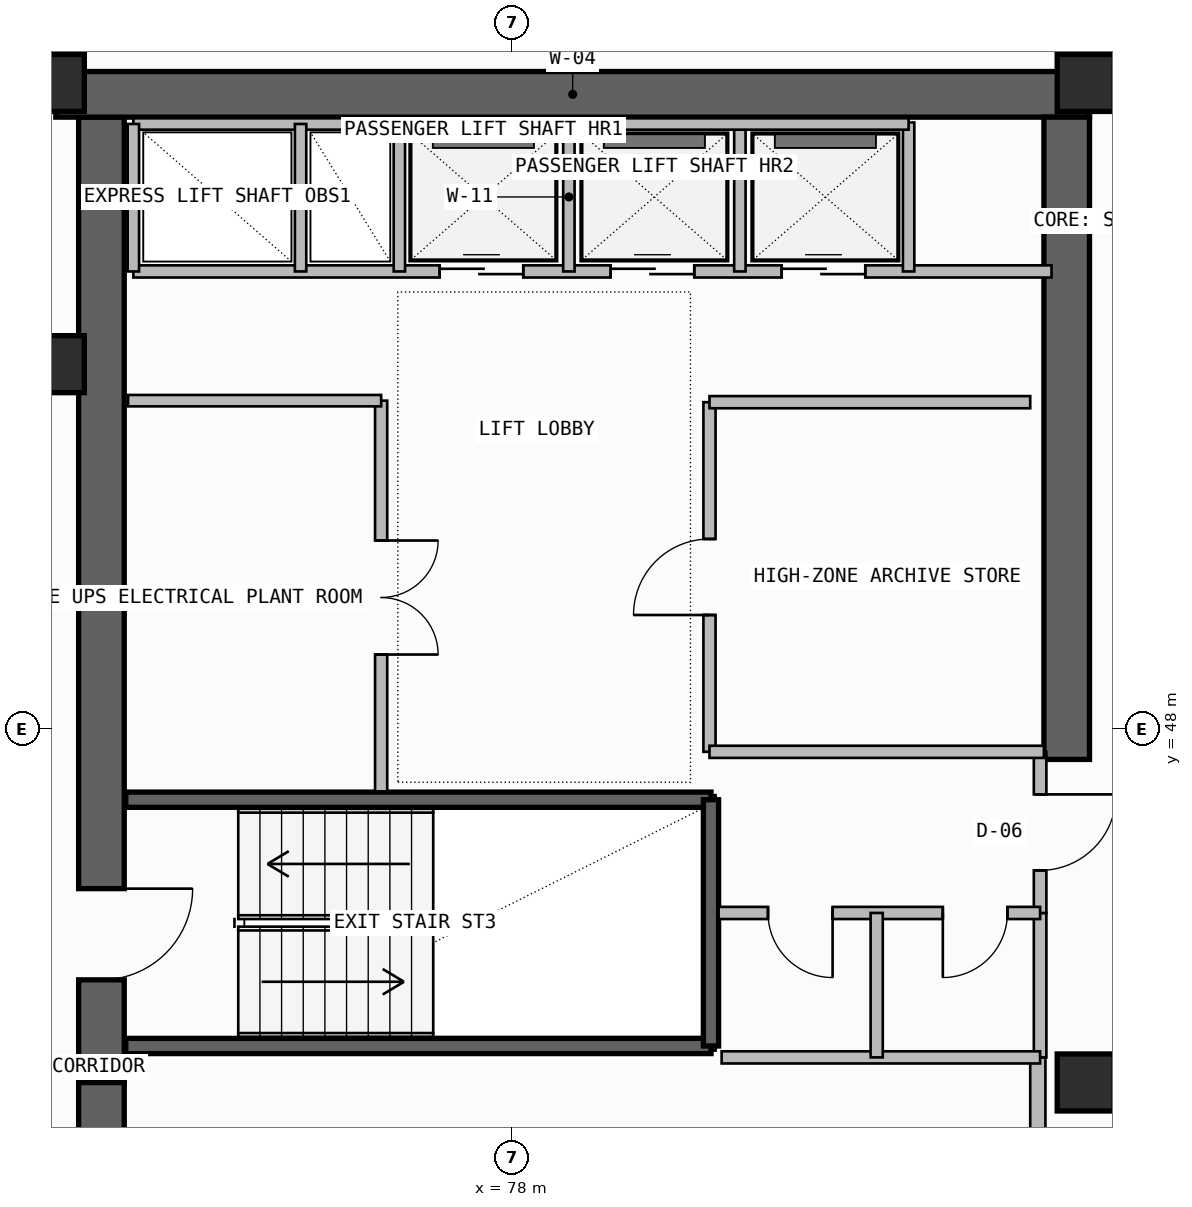
"""IFC4 building model, lengths in metres.
Left out: names, types, materials, properties, quantities, classifications, styles, units other than length and angle.
Written with IfcOpenShell. Run it as: python <this file> out.ifc"""

import sys

from ifc_helpers import new_model, si_unit, direction, frame, frame_2d, origin, origin_2d, place, context, subcontext, project, spatial, rectangle, extrude, element, fill, save


model = new_model("IFC4")
c1 = context("Model", 3, precision=1e-05, world=origin(), true_north=direction((0.0, 1.0)))
c2 = subcontext(c1, "Body", "Model", "MODEL_VIEW")
j1 = project(units=[si_unit("LENGTHUNIT", "METRE"), si_unit("PLANEANGLEUNIT", "RADIAN")], contexts=[c1])
p1 = place(None, origin())
s1 = spatial("IfcSite", under=j1, at=p1, CompositionType="ELEMENT")
p2 = place(p1, origin())
s2 = spatial("IfcBuilding", under=s1, at=p2, CompositionType="ELEMENT")
p3 = place(p2, frame((0.0, 0.0, 281.86)))
s3 = spatial("IfcBuildingStorey", under=s2, at=p3, CompositionType="ELEMENT", Elevation=281.86)
p4 = place(p3, frame((72.6, 35.5, -0.26), z_axis=(0.0, 0.0, 1.0), x_axis=(0.0, 1.0, 0.0)))
e1 = element("IfcWall", 1, at=p4, inside=s3, PredefinedType="SHEAR", context=c2, shape_type="SweptSolid", body=[
    extrude(rectangle(XDim=7.85, YDim=0.6, at=frame_2d((3.925, 0.0))), origin(), (0.0, 0.0, 1.0), 3.52),
])
p5 = place(p4, frame((1.45, 0.0, 0.26)))
e2 = element("IfcOpeningElement", 2, at=p5, cuts=e1, PredefinedType="OPENING", context=c2, shape_type="SweptSolid", body=[
    extrude(rectangle(XDim=1.2, YDim=2.2, at=frame_2d((0.6, 1.1))), frame((0.0, 0.31, 0.0), z_axis=(0.0, -1.0, 0.0), x_axis=(1.0, 0.0, 0.0)), (0.0, 0.0, 1.0), 0.62),
])
p6 = place(p3, frame((72.6, 43.35, -0.26), z_axis=(0.0, 0.0, 1.0), x_axis=(0.0, 1.0, 0.0)))
e3 = element("IfcWall", 3, at=p6, inside=s3, PredefinedType="SHEAR", context=c2, shape_type="SweptSolid", body=[
    extrude(rectangle(XDim=12.7, YDim=0.6, at=frame_2d((6.35, 0.0))), origin(), (0.0, 0.0, 1.0), 3.52),
])
p7 = place(p6, frame((1.35, 0.0, 0.26)))
e4 = element("IfcOpeningElement", 4, at=p7, cuts=e3, PredefinedType="OPENING", context=c2, shape_type="SweptSolid", body=[
    extrude(rectangle(XDim=1.2, YDim=2.2, at=frame_2d((0.6, 1.1))), frame((0.0, 0.31, 0.0), z_axis=(0.0, -1.0, 0.0), x_axis=(1.0, 0.0, 0.0)), (0.0, 0.0, 1.0), 0.62),
])
p8 = place(p3, frame((72.0, 56.35, -0.26), z_axis=(0.0, 0.0, 1.0), x_axis=(1.0, 0.0, 0.0)))
e5 = element("IfcWall", 5, at=p8, inside=s3, PredefinedType="SHEAR", context=c2, shape_type="SweptSolid", body=[
    extrude(rectangle(XDim=13.6, YDim=0.6, at=frame_2d((6.8, 0.0))), origin(), (0.0, 0.0, 1.0), 3.52),
])
p9 = place(p3, frame((85.3, 47.6, -0.26), z_axis=(0.0, 0.0, 1.0), x_axis=(0.0, 1.0, 0.0)))
e6 = element("IfcWall", 6, at=p9, inside=s3, PredefinedType="SHEAR", context=c2, shape_type="SweptSolid", body=[
    extrude(rectangle(XDim=8.45, YDim=0.6, at=frame_2d((4.225, 0.0))), origin(), (0.0, 0.0, 1.0), 3.52),
])
for number, where, z_axis, x_axis in (
    (7, (85.55, 43.35, 0.0), (0.0, 0.0, 1.0), (1.0, 0.0, 0.0)),
    (8, (72.0, 52.8, 0.0), (0.0, 0.0, 1.0), (1.0, 0.0, 0.0)),
    (9, (72.0, 56.5, 0.0), (0.0, 0.0, 1.0), (1.0, 0.0, 0.0)),
    (10, (85.55, 56.5, 0.0), (0.0, 0.0, 1.0), (1.0, 0.0, 0.0)),
):
    element("IfcColumn", number, at=place(p3, frame(where, z_axis=z_axis, x_axis=x_axis)), inside=s3, PredefinedType="COLUMN", context=c2, shape_type="SweptSolid", body=[
        extrude(rectangle(XDim=0.75, YDim=0.75, at=origin_2d()), origin(), (0.0, 0.0, 1.0), 3.52),
    ])
p10 = place(p3, frame((84.92, 38.85, 0.0), z_axis=(0.0, 0.0, 1.0), x_axis=(0.0, 1.0, 0.0)))
e11 = element("IfcWall", 11, at=p10, inside=s3, PredefinedType="SOLIDWALL", context=c2, shape_type="SweptSolid", body=[
    extrude(rectangle(XDim=4.83, YDim=0.2, at=frame_2d((2.415, 0.0))), origin(), (0.0, 0.0, 1.0), 3.26),
])
p11 = place(p10, frame((1.25, 0.0, 0.0)))
e12 = element("IfcOpeningElement", 12, at=p11, cuts=e11, PredefinedType="OPENING", context=c2, shape_type="SweptSolid", body=[
    extrude(rectangle(XDim=1.1, YDim=2.2, at=frame_2d((0.55, 1.1))), frame((0.0, 0.11, 0.0), z_axis=(0.0, -1.0, 0.0), x_axis=(1.0, 0.0, 0.0)), (0.0, 0.0, 1.0), 0.22),
])
for number, where, z_axis, x_axis in (
    (13, (72.92, 43.83, -0.26), (0.0, 0.0, 1.0), (1.0, 0.0, 0.0)),
    (14, (72.92, 47.07, -0.26), (0.0, 0.0, 1.0), (1.0, 0.0, 0.0)),
):
    element("IfcWall", number, at=place(p3, frame(where, z_axis=z_axis, x_axis=x_axis)), inside=s3, PredefinedType="SOLIDWALL", context=c2, shape_type="SweptSolid", body=[
        extrude(rectangle(XDim=7.7, YDim=0.2, at=frame_2d((3.85, 0.0))), origin(), (0.0, 0.0, 1.0), 3.52),
    ])
p12 = place(p3, frame((80.62, 43.83, -0.26), z_axis=(0.0, 0.0, 1.0), x_axis=(0.0, 1.0, 0.0)))
e15 = element("IfcWall", 15, at=p12, inside=s3, PredefinedType="SOLIDWALL", context=c2, shape_type="SweptSolid", body=[
    extrude(rectangle(XDim=3.24, YDim=0.2, at=frame_2d((1.62, 0.0))), origin(), (0.0, 0.0, 1.0), 3.52),
])
p13 = place(p3, frame((84.95, 43.68, 0.0), z_axis=(0.0, 0.0, 1.0), x_axis=(0.0, 1.0, 0.0)))
e16 = element("IfcWall", 16, at=p13, inside=s3, PredefinedType="PLUMBINGWALL", context=c2, shape_type="SweptSolid", body=[
    extrude(rectangle(XDim=1.9, YDim=0.165, at=frame_2d((0.95, 0.0))), origin(), (0.0, 0.0, 1.0), 3.26),
])
p14 = place(p3, frame((84.95, 45.58, 0.0), z_axis=(0.0, 0.0, 1.0), x_axis=(0.0, 1.0, 0.0)))
e17 = element("IfcWall", 17, at=p14, inside=s3, PredefinedType="PARTITIONING", context=c2, shape_type="SweptSolid", body=[
    extrude(rectangle(XDim=2.12, YDim=0.165, at=frame_2d((1.06, 0.0))), origin(), (0.0, 0.0, 1.0), 3.26),
])
p15 = place(p14, frame((0.56, 0.0, 0.0)))
e18 = element("IfcOpeningElement", 18, at=p15, cuts=e17, PredefinedType="OPENING", context=c2, shape_type="SweptSolid", body=[
    extrude(rectangle(XDim=1.0, YDim=2.2, at=frame_2d((0.5, 1.1))), frame((0.0, 0.093, 0.0), z_axis=(0.0, -1.0, 0.0), x_axis=(1.0, 0.0, 0.0)), (0.0, 0.0, 1.0), 0.185),
])
p16 = place(p3, frame((80.72, 45.58, 0.0), z_axis=(0.0, 0.0, 1.0), x_axis=(1.0, 0.0, 0.0)))
e19 = element("IfcWall", 19, at=p16, inside=s3, PredefinedType="PLUMBINGWALL", context=c2, shape_type="SweptSolid", body=[
    extrude(rectangle(XDim=4.23, YDim=0.16, at=frame_2d((2.115, 0.0))), origin(), (0.0, 0.0, 1.0), 3.26),
])
p17 = place(p16, frame((0.65, 0.0, 0.0)))
e20 = element("IfcOpeningElement", 20, at=p17, cuts=e19, PredefinedType="OPENING", context=c2, shape_type="SweptSolid", body=[
    extrude(rectangle(XDim=0.85, YDim=2.05, at=frame_2d((0.425, 1.025))), frame((0.0, 0.09, 0.0), z_axis=(0.0, -1.0, 0.0), x_axis=(1.0, 0.0, 0.0)), (0.0, 0.0, 1.0), 0.18),
])
p18 = place(p16, frame((2.95, 0.0, 0.0)))
e21 = element("IfcOpeningElement", 21, at=p18, cuts=e19, PredefinedType="OPENING", context=c2, shape_type="SweptSolid", body=[
    extrude(rectangle(XDim=0.85, YDim=2.05, at=frame_2d((0.425, 1.025))), frame((0.0, 0.09, 0.0), z_axis=(0.0, -1.0, 0.0), x_axis=(1.0, 0.0, 0.0)), (0.0, 0.0, 1.0), 0.18),
])
p19 = place(p3, frame((80.76, 43.68, 0.0), z_axis=(0.0, 0.0, 1.0), x_axis=(1.0, 0.0, 0.0)))
e22 = element("IfcWall", 22, at=p19, inside=s3, PredefinedType="PLUMBINGWALL", context=c2, shape_type="SweptSolid", body=[
    extrude(rectangle(XDim=4.19, YDim=0.16, at=frame_2d((2.095, 0.0))), origin(), (0.0, 0.0, 1.0), 3.26),
])
p20 = place(p3, frame((82.8, 43.68, 0.0), z_axis=(0.0, 0.0, 1.0), x_axis=(0.0, 1.0, 0.0)))
e23 = element("IfcWall", 23, at=p20, inside=s3, PredefinedType="PLUMBINGWALL", context=c2, shape_type="SweptSolid", body=[
    extrude(rectangle(XDim=1.9, YDim=0.16, at=frame_2d((0.95, 0.0))), origin(), (0.0, 0.0, 1.0), 3.26),
])
p21 = place(p3, frame((76.28, 47.18, 0.0), z_axis=(0.0, 0.0, 1.0), x_axis=(0.0, 1.0, 0.0)))
e24 = element("IfcWall", 24, at=p21, inside=s3, PredefinedType="SOLIDWALL", context=c2, shape_type="SweptSolid", body=[
    extrude(rectangle(XDim=5.14, YDim=0.16, at=frame_2d((2.57, 0.0))), origin(), (0.0, 0.0, 1.0), 3.26),
])
p22 = place(p21, frame((1.8, 0.0, 0.0)))
e25 = element("IfcOpeningElement", 25, at=p22, cuts=e24, PredefinedType="OPENING", context=c2, shape_type="SweptSolid", body=[
    extrude(rectangle(XDim=1.5, YDim=2.25, at=frame_2d((0.75, 1.125))), frame((0.0, 0.09, 0.0), z_axis=(0.0, -1.0, 0.0), x_axis=(1.0, 0.0, 0.0)), (0.0, 0.0, 1.0), 0.18),
])
p23 = place(p3, frame((72.95, 52.32, 0.0), z_axis=(0.0, 0.0, 1.0), x_axis=(1.0, 0.0, 0.0)))
e26 = element("IfcWall", 26, at=p23, inside=s3, PredefinedType="SOLIDWALL", context=c2, shape_type="SweptSolid", body=[
    extrude(rectangle(XDim=3.33, YDim=0.15, at=frame_2d((1.665, 0.0))), origin(), (0.0, 0.0, 1.0), 3.26),
])
p24 = place(p3, frame((80.6, 47.7, 0.0), z_axis=(0.0, 0.0, 1.0), x_axis=(0.0, 1.0, 0.0)))
e27 = element("IfcWall", 27, at=p24, inside=s3, PredefinedType="SOLIDWALL", context=c2, shape_type="SweptSolid", body=[
    extrude(rectangle(XDim=4.6, YDim=0.16, at=frame_2d((2.3, 0.0))), origin(), (0.0, 0.0, 1.0), 3.26),
])
p25 = place(p24, frame((1.8, 0.0, 0.0)))
e28 = element("IfcOpeningElement", 28, at=p25, cuts=e27, PredefinedType="OPENING", context=c2, shape_type="SweptSolid", body=[
    extrude(rectangle(XDim=1.0, YDim=2.2, at=frame_2d((0.5, 1.1))), frame((0.0, 0.09, 0.0), z_axis=(0.0, -1.0, 0.0), x_axis=(1.0, 0.0, 0.0)), (0.0, 0.0, 1.0), 0.18),
])
p26 = place(p3, frame((80.6, 47.7, 0.0), z_axis=(0.0, 0.0, 1.0), x_axis=(1.0, 0.0, 0.0)))
e29 = element("IfcWall", 29, at=p26, inside=s3, PredefinedType="SOLIDWALL", context=c2, shape_type="SweptSolid", body=[
    extrude(rectangle(XDim=4.4, YDim=0.16, at=frame_2d((2.2, 0.0))), origin(), (0.0, 0.0, 1.0), 3.26),
])
p27 = place(p3, frame((80.6, 52.3, 0.0), z_axis=(0.0, 0.0, 1.0), x_axis=(1.0, 0.0, 0.0)))
e30 = element("IfcWall", 30, at=p27, inside=s3, PredefinedType="SOLIDWALL", context=c2, shape_type="SweptSolid", body=[
    extrude(rectangle(XDim=4.22, YDim=0.16, at=frame_2d((2.11, 0.0))), origin(), (0.0, 0.0, 1.0), 3.26),
])
p28 = place(p3, frame((73.02, 54.02, 0.0), z_axis=(0.0, 0.0, 1.0), x_axis=(1.0, 0.0, 0.0)))
e31 = element("IfcWall", 31, at=p28, inside=s3, PredefinedType="SOLIDWALL", context=c2, shape_type="SweptSolid", body=[
    extrude(rectangle(XDim=12.08, YDim=0.16, at=frame_2d((6.04, 0.0))), origin(), (0.0, 0.0, 1.0), 3.26),
])
p29 = place(p28, frame((4.03, 0.0, 0.0)))
e32 = element("IfcOpeningElement", 32, at=p29, cuts=e31, PredefinedType="OPENING", context=c2, shape_type="SweptSolid", body=[
    extrude(rectangle(XDim=1.1, YDim=2.25, at=frame_2d((0.55, 1.125))), frame((0.0, 0.09, 0.0), z_axis=(0.0, -1.0, 0.0), x_axis=(1.0, 0.0, 0.0)), (0.0, 0.0, 1.0), 0.18),
])
p30 = place(p28, frame((6.28, 0.0, 0.0)))
e33 = element("IfcOpeningElement", 33, at=p30, cuts=e31, PredefinedType="OPENING", context=c2, shape_type="SweptSolid", body=[
    extrude(rectangle(XDim=1.1, YDim=2.25, at=frame_2d((0.55, 1.125))), frame((0.0, 0.09, 0.0), z_axis=(0.0, -1.0, 0.0), x_axis=(1.0, 0.0, 0.0)), (0.0, 0.0, 1.0), 0.18),
])
p31 = place(p28, frame((8.53, 0.0, 0.0)))
e34 = element("IfcOpeningElement", 34, at=p31, cuts=e31, PredefinedType="OPENING", context=c2, shape_type="SweptSolid", body=[
    extrude(rectangle(XDim=1.1, YDim=2.25, at=frame_2d((0.55, 1.125))), frame((0.0, 0.09, 0.0), z_axis=(0.0, -1.0, 0.0), x_axis=(1.0, 0.0, 0.0)), (0.0, 0.0, 1.0), 0.18),
])
p32 = place(p3, frame((73.02, 55.96, 0.0), z_axis=(0.0, 0.0, 1.0), x_axis=(1.0, 0.0, 0.0)))
e35 = element("IfcWall", 35, at=p32, inside=s3, PredefinedType="SOLIDWALL", context=c2, shape_type="SweptSolid", body=[
    extrude(rectangle(XDim=3.5, YDim=0.15, at=frame_2d((1.75, 0.0))), origin(), (0.0, 0.0, 1.0), 3.26),
])
p33 = place(p3, frame((73.02, 54.02, 0.0), z_axis=(0.0, 0.0, 1.0), x_axis=(0.0, 1.0, 0.0)))
e36 = element("IfcWall", 36, at=p33, inside=s3, PredefinedType="PLUMBINGWALL", context=c2, shape_type="SweptSolid", body=[
    extrude(rectangle(XDim=1.94, YDim=0.15, at=frame_2d((0.97, 0.0))), origin(), (0.0, 0.0, 1.0), 3.26),
])
p34 = place(p3, frame((76.52, 54.02, 0.0), z_axis=(0.0, 0.0, 1.0), x_axis=(0.0, 1.0, 0.0)))
e37 = element("IfcWall", 37, at=p34, inside=s3, PredefinedType="SOLIDWALL", context=c2, shape_type="SweptSolid", body=[
    extrude(rectangle(XDim=1.94, YDim=0.15, at=frame_2d((0.97, 0.0))), origin(), (0.0, 0.0, 1.0), 3.26),
])
p35 = place(p3, frame((75.22, 54.02, 0.0), z_axis=(0.0, 0.0, 1.0), x_axis=(0.0, 1.0, 0.0)))
e38 = element("IfcWall", 38, at=p35, inside=s3, PredefinedType="PLUMBINGWALL", context=c2, shape_type="SweptSolid", body=[
    extrude(rectangle(XDim=1.94, YDim=0.15, at=frame_2d((0.97, 0.0))), origin(), (0.0, 0.0, 1.0), 3.26),
])
for number, where, z_axis, x_axis in (
    (39, (78.75, 54.02, 0.0), (0.0, 0.0, 1.0), (0.0, 1.0, 0.0)),
    (40, (81.0, 54.02, 0.0), (0.0, 0.0, 1.0), (0.0, 1.0, 0.0)),
):
    element("IfcWall", number, at=place(p3, frame(where, z_axis=z_axis, x_axis=x_axis)), inside=s3, PredefinedType="PLUMBINGWALL", context=c2, shape_type="SweptSolid", body=[
        extrude(rectangle(XDim=1.96, YDim=0.15, at=frame_2d((0.98, 0.0))), origin(), (0.0, 0.0, 1.0), 3.26),
    ])
p36 = place(p3, frame((83.22, 54.02, 0.0), z_axis=(0.0, 0.0, 1.0), x_axis=(0.0, 1.0, 0.0)))
e41 = element("IfcWall", 41, at=p36, inside=s3, PredefinedType="SOLIDWALL", context=c2, shape_type="SweptSolid", body=[
    extrude(rectangle(XDim=1.96, YDim=0.15, at=frame_2d((0.98, 0.0))), origin(), (0.0, 0.0, 1.0), 3.26),
])
p37 = place(p3, frame((76.52, 55.96, 0.0), z_axis=(0.0, 0.0, 1.0), x_axis=(1.0, 0.0, 0.0)))
e42 = element("IfcWall", 42, at=p37, inside=s3, PredefinedType="SOLIDWALL", context=c2, shape_type="SweptSolid", body=[
    extrude(rectangle(XDim=6.7, YDim=0.15, at=frame_2d((3.35, 0.0))), origin(), (0.0, 0.0, 1.0), 3.26),
])
p38 = place(p7, frame((1.2, 0.0, 0.0), z_axis=(0.0, 0.0, 1.0), x_axis=(-1.0, 0.0, 0.0)))
e43 = element("IfcDoor", 43, at=p38, inside=s3, OperationType="SINGLE_SWING_LEFT", PredefinedType="USERDEFINED", context=c2, shape_type="SweptSolid", body=[
    extrude(rectangle(XDim=1.2, YDim=2.2, at=frame_2d((0.6, 1.1))), frame((0.0, 0.025, 0.0), z_axis=(0.0, -1.0, 0.0), x_axis=(1.0, 0.0, 0.0)), (0.0, 0.0, 1.0), 0.05),
])
fill(e4, e43)
p39 = place(p15, frame((1.0, 0.0, 0.0), z_axis=(0.0, 0.0, 1.0), x_axis=(-1.0, 0.0, 0.0)))
e44 = element("IfcDoor", 44, at=p39, inside=s3, OperationType="SINGLE_SWING_LEFT", PredefinedType="DOOR", context=c2, shape_type="SweptSolid", body=[
    extrude(rectangle(XDim=1.0, YDim=2.2, at=frame_2d((0.5, 1.1))), frame((0.0, 0.025, 0.0), z_axis=(0.0, -1.0, 0.0), x_axis=(1.0, 0.0, 0.0)), (0.0, 0.0, 1.0), 0.05),
])
fill(e18, e44)
p40 = place(p17, frame((0.85, 0.0, 0.0), z_axis=(0.0, 0.0, 1.0), x_axis=(-1.0, 0.0, 0.0)))
e45 = element("IfcDoor", 45, at=p40, inside=s3, OperationType="SINGLE_SWING_LEFT", PredefinedType="DOOR", context=c2, shape_type="SweptSolid", body=[
    extrude(rectangle(XDim=0.85, YDim=2.05, at=frame_2d((0.425, 1.025))), frame((0.0, 0.025, 0.0), z_axis=(0.0, -1.0, 0.0), x_axis=(1.0, 0.0, 0.0)), (0.0, 0.0, 1.0), 0.05),
])
fill(e20, e45)
p41 = place(p18, frame((0.85, 0.0, 0.0), z_axis=(0.0, 0.0, 1.0), x_axis=(-1.0, 0.0, 0.0)))
e46 = element("IfcDoor", 46, at=p41, inside=s3, OperationType="SINGLE_SWING_RIGHT", PredefinedType="DOOR", context=c2, shape_type="SweptSolid", body=[
    extrude(rectangle(XDim=0.85, YDim=2.05, at=frame_2d((0.425, 1.025))), frame((0.0, 0.025, 0.0), z_axis=(0.0, -1.0, 0.0), x_axis=(1.0, 0.0, 0.0)), (0.0, 0.0, 1.0), 0.05),
])
fill(e21, e46)
p42 = place(p22, frame((1.5, 0.0, 0.0), z_axis=(0.0, 0.0, 1.0), x_axis=(-1.0, 0.0, 0.0)))
e47 = element("IfcDoor", 47, at=p42, inside=s3, OperationType="DOUBLE_DOOR_SINGLE_SWING", PredefinedType="DOOR", context=c2, shape_type="SweptSolid", body=[
    extrude(rectangle(XDim=1.5, YDim=2.25, at=frame_2d((0.75, 1.125))), frame((0.0, 0.025, 0.0), z_axis=(0.0, -1.0, 0.0), x_axis=(1.0, 0.0, 0.0)), (0.0, 0.0, 1.0), 0.05),
])
fill(e25, e47)
p43 = place(p25, origin())
e48 = element("IfcDoor", 48, at=p43, inside=s3, OperationType="SINGLE_SWING_LEFT", PredefinedType="DOOR", context=c2, shape_type="SweptSolid", body=[
    extrude(rectangle(XDim=1.0, YDim=2.2, at=frame_2d((0.5, 1.1))), frame((0.0, 0.025, 0.0), z_axis=(0.0, -1.0, 0.0), x_axis=(1.0, 0.0, 0.0)), (0.0, 0.0, 1.0), 0.05),
])
fill(e28, e48)
p44 = place(p29, origin())
e49 = element("IfcDoor", 49, at=p44, inside=s3, OperationType="DOUBLE_DOOR_SLIDING", PredefinedType="DOOR", context=c2, shape_type="SweptSolid", body=[
    extrude(rectangle(XDim=1.1, YDim=2.25, at=frame_2d((0.55, 1.125))), frame((0.0, 0.025, 0.0), z_axis=(0.0, -1.0, 0.0), x_axis=(1.0, 0.0, 0.0)), (0.0, 0.0, 1.0), 0.05),
])
fill(e32, e49)
p45 = place(p30, origin())
e50 = element("IfcDoor", 50, at=p45, inside=s3, OperationType="DOUBLE_DOOR_SLIDING", PredefinedType="DOOR", context=c2, shape_type="SweptSolid", body=[
    extrude(rectangle(XDim=1.1, YDim=2.25, at=frame_2d((0.55, 1.125))), frame((0.0, 0.025, 0.0), z_axis=(0.0, -1.0, 0.0), x_axis=(1.0, 0.0, 0.0)), (0.0, 0.0, 1.0), 0.05),
])
fill(e33, e50)
p46 = place(p31, origin())
e51 = element("IfcDoor", 51, at=p46, inside=s3, OperationType="DOUBLE_DOOR_SLIDING", PredefinedType="DOOR", context=c2, shape_type="SweptSolid", body=[
    extrude(rectangle(XDim=1.1, YDim=2.25, at=frame_2d((0.55, 1.125))), frame((0.0, 0.025, 0.0), z_axis=(0.0, -1.0, 0.0), x_axis=(1.0, 0.0, 0.0)), (0.0, 0.0, 1.0), 0.05),
])
fill(e34, e51)
save(model, sys.argv[1])
